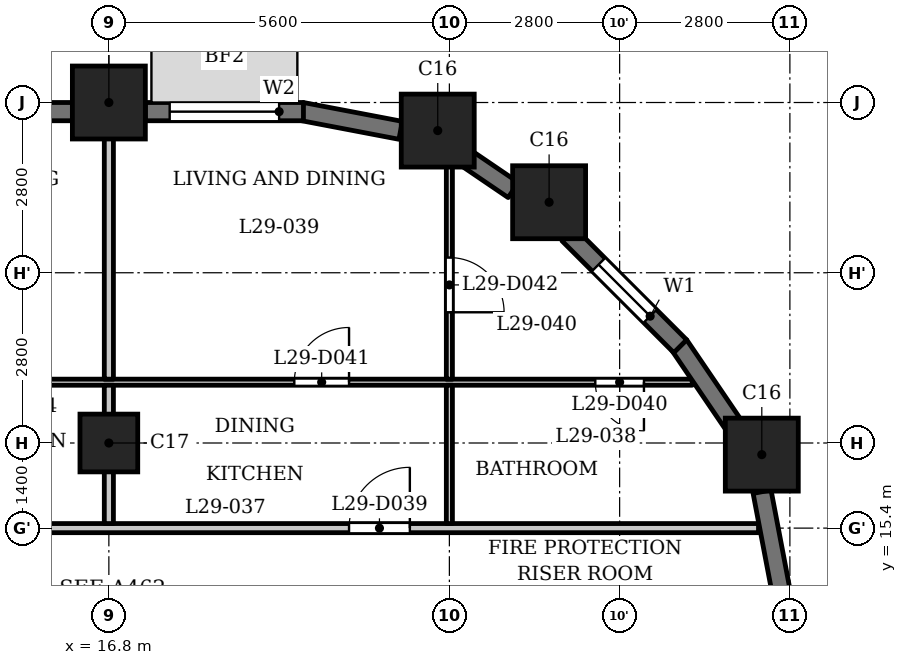
"""IFC4 building model, lengths in metres.
Left out: names, types, materials, properties, quantities, classifications, styles, units other than length and angle.
Written with IfcOpenShell. Run it as: python <this file> out.ifc"""

import sys

from ifc_helpers import new_model, si_unit, direction, frame, frame_2d, origin, origin_2d, place, context, subcontext, project, spatial, rectangle, extrude, element, fill, save


model = new_model("IFC4")
c1 = context("Model", 3, precision=1e-05, world=origin(), true_north=direction((0.0, 1.0)))
c2 = subcontext(c1, "Body", "Model", "MODEL_VIEW")
j1 = project(units=[si_unit("LENGTHUNIT", "METRE"), si_unit("PLANEANGLEUNIT", "RADIAN")], contexts=[c1])
p1 = place(None, origin())
s1 = spatial("IfcSite", under=j1, at=p1, CompositionType="ELEMENT")
p2 = place(p1, origin())
s2 = spatial("IfcBuilding", under=s1, at=p2, CompositionType="ELEMENT")
p3 = place(p2, frame((0.0, 0.0, 114.8)))
s3 = spatial("IfcBuildingStorey", under=s2, at=p3, CompositionType="ELEMENT", Elevation=114.8)
for number, where, z_axis, x_axis in (
    (1, (27.538, 16.609, 0.0), (0.0, 0.0, 1.0), (1.0, 0.0, 0.0)),
    (2, (24.04, 20.76, 0.0), (0.0, 0.0, 1.0), (1.0, 0.0, 0.0)),
    (3, (22.209, 21.938, 0.0), (0.0, 0.0, 1.0), (1.0, 0.0, 0.0)),
    (4, (16.8, 22.4, 0.0), (0.0, 0.0, 1.0), (1.0, 0.0, 0.0)),
):
    element("IfcColumn", number, at=place(p3, frame(where, z_axis=z_axis, x_axis=x_axis)), inside=s3, PredefinedType="COLUMN", context=c2, shape_type="SweptSolid", body=[
        extrude(rectangle(XDim=1.2, YDim=1.2, at=origin_2d()), origin(), (0.0, 0.0, 1.0), 3.5),
    ])
p4 = place(p3, frame((16.8, 16.8, 0.0), z_axis=(0.0, 0.0, 1.0), x_axis=(1.0, 0.0, 0.0)))
e5 = element("IfcColumn", 5, at=p4, inside=s3, PredefinedType="COLUMN", context=c2, shape_type="SweptSolid", body=[
    extrude(rectangle(XDim=0.95, YDim=0.95, at=origin_2d()), origin(), (0.0, 0.0, 1.0), 3.5),
])
for number, where, z_axis, x_axis in (
    (6, (27.853, 14.372, 0.0), (0.0, 0.0, 1.0), (-0.187, 0.982, 0.0)),
    (7, (27.11, 17.043, 0.0), (0.0, 0.0, 1.0), (-0.562, 0.827, 0.0)),
):
    element("IfcWall", number, at=place(p3, frame(where, z_axis=z_axis, x_axis=x_axis)), inside=s3, PredefinedType="SOLIDWALL", context=c2, shape_type="SweptSolid", body=[
        extrude(rectangle(XDim=1.656, YDim=0.3, at=frame_2d((0.828, 0.0))), origin(), (0.0, 0.0, 1.0), 2.4),
    ])
p5 = place(p3, frame((26.197, 18.391, 0.0), z_axis=(0.0, 0.0, 1.0), x_axis=(-0.707059830104, 0.707153729152, 0.0)))
e8 = element("IfcWall", 8, at=p5, inside=s3, PredefinedType="SOLIDWALL", context=c2, shape_type="SweptSolid", body=[
    extrude(rectangle(XDim=2.6, YDim=0.3, at=frame_2d((1.3, 0.0))), origin(), (0.0, 0.0, 1.0), 2.4),
])
p6 = place(p5, frame((0.7, 0.0, 0.6)))
e9 = element("IfcOpeningElement", 9, at=p6, cuts=e8, PredefinedType="OPENING", context=c2, shape_type="SweptSolid", body=[
    extrude(rectangle(XDim=1.2, YDim=1.55, at=frame_2d((0.6, 0.775))), frame((0.0, 0.16, 0.0), z_axis=(0.0, -1.0, 0.0), x_axis=(1.0, 0.0, 0.0)), (0.0, 0.0, 1.0), 0.32),
])
p7 = place(p3, frame((23.451, 20.96, 0.0), z_axis=(0.0, 0.0, 1.0), x_axis=(-0.827019434577, 0.562173331661, 0.0)))
e10 = element("IfcWall", 10, at=p7, inside=s3, PredefinedType="SOLIDWALL", context=c2, shape_type="SweptSolid", body=[
    extrude(rectangle(XDim=0.977, YDim=0.3, at=frame_2d((0.489, 0.0))), origin(), (0.0, 0.0, 1.0), 3.2),
])
p8 = place(p3, frame((21.599, 21.942, 0.0), z_axis=(0.0, 0.0, 1.0), x_axis=(-0.98228820662, 0.187376303559, 0.0)))
e11 = element("IfcWall", 11, at=p8, inside=s3, PredefinedType="SOLIDWALL", context=c2, shape_type="SweptSolid", body=[
    extrude(rectangle(XDim=1.656, YDim=0.3, at=frame_2d((0.828, 0.0))), origin(), (0.0, 0.0, 1.0), 2.4),
])
p9 = place(p3, frame((20.0, 22.25, 0.0), z_axis=(0.0, 0.0, 1.0), x_axis=(-1.0, 0.0, 0.0)))
e12 = element("IfcWall", 12, at=p9, inside=s3, PredefinedType="SOLIDWALL", context=c2, shape_type="SweptSolid", body=[
    extrude(rectangle(XDim=2.6, YDim=0.3, at=frame_2d((1.3, 0.0))), origin(), (0.0, 0.0, 1.0), 2.4),
])
p10 = place(p9, frame((0.4, 0.0, 0.9)))
e13 = element("IfcOpeningElement", 13, at=p10, cuts=e12, PredefinedType="OPENING", context=c2, shape_type="SweptSolid", body=[
    extrude(rectangle(XDim=1.8, YDim=1.25, at=frame_2d((0.9, 0.625))), frame((0.0, 0.16, 0.0), z_axis=(0.0, -1.0, 0.0), x_axis=(1.0, 0.0, 0.0)), (0.0, 0.0, 1.0), 0.32),
])
p11 = place(p3, frame((16.2, 22.25, 0.0), z_axis=(0.0, 0.0, 1.0), x_axis=(-1.0, 0.0, 0.0)))
e14 = element("IfcWall", 14, at=p11, inside=s3, PredefinedType="SOLIDWALL", context=c2, shape_type="SweptSolid", body=[
    extrude(rectangle(XDim=4.4, YDim=0.3, at=frame_2d((2.2, 0.0))), origin(), (0.0, 0.0, 1.0), 2.4),
])
p12 = place(p11, frame((0.4, 0.0, 1.2)))
e15 = element("IfcOpeningElement", 15, at=p12, cuts=e14, PredefinedType="OPENING", context=c2, shape_type="SweptSolid", body=[
    extrude(rectangle(XDim=3.6, YDim=0.95, at=frame_2d((1.8, 0.475))), frame((0.0, 0.16, 0.0), z_axis=(0.0, -1.0, 0.0), x_axis=(1.0, 0.0, 0.0)), (0.0, 0.0, 1.0), 0.32),
])
p13 = place(p3, frame((-27.484, 15.4, 0.0), z_axis=(0.0, 0.0, 1.0), x_axis=(1.0, 0.0, 0.0)))
e16 = element("IfcWall", 16, at=p13, inside=s3, PredefinedType="PARTITIONING", context=c2, shape_type="SweptSolid", body=[
    extrude(rectangle(XDim=54.968, YDim=0.15, at=frame_2d((27.484, 0.0))), origin(), (0.0, 0.0, 1.0), 3.2),
])
p14 = place(p13, frame((9.034, 0.0, 0.0)))
e17 = element("IfcOpeningElement", 17, at=p14, cuts=e16, PredefinedType="OPENING", context=c2, shape_type="SweptSolid", body=[
    extrude(rectangle(XDim=1.0, YDim=2.1, at=frame_2d((0.5, 1.05))), frame((0.0, 0.085, 0.0), z_axis=(0.0, -1.0, 0.0), x_axis=(1.0, 0.0, 0.0)), (0.0, 0.0, 1.0), 0.17),
])
p15 = place(p13, frame((14.634, 0.0, 0.0)))
e18 = element("IfcOpeningElement", 18, at=p15, cuts=e16, PredefinedType="OPENING", context=c2, shape_type="SweptSolid", body=[
    extrude(rectangle(XDim=1.0, YDim=2.1, at=frame_2d((0.5, 1.05))), frame((0.0, 0.085, 0.0), z_axis=(0.0, -1.0, 0.0), x_axis=(1.0, 0.0, 0.0)), (0.0, 0.0, 1.0), 0.17),
])
p16 = place(p13, frame((16.984, 0.0, 0.0)))
e19 = element("IfcOpeningElement", 19, at=p16, cuts=e16, PredefinedType="OPENING", context=c2, shape_type="SweptSolid", body=[
    extrude(rectangle(XDim=1.0, YDim=2.1, at=frame_2d((0.5, 1.05))), frame((0.0, 0.085, 0.0), z_axis=(0.0, -1.0, 0.0), x_axis=(1.0, 0.0, 0.0)), (0.0, 0.0, 1.0), 0.17),
])
p17 = place(p13, frame((28.084, 0.0, 0.0)))
e20 = element("IfcOpeningElement", 20, at=p17, cuts=e16, PredefinedType="OPENING", context=c2, shape_type="SweptSolid", body=[
    extrude(rectangle(XDim=1.0, YDim=2.1, at=frame_2d((0.5, 1.05))), frame((0.0, 0.085, 0.0), z_axis=(0.0, -1.0, 0.0), x_axis=(1.0, 0.0, 0.0)), (0.0, 0.0, 1.0), 0.17),
])
p18 = place(p13, frame((34.834, 0.0, 0.0)))
e21 = element("IfcOpeningElement", 21, at=p18, cuts=e16, PredefinedType="OPENING", context=c2, shape_type="SweptSolid", body=[
    extrude(rectangle(XDim=1.0, YDim=2.1, at=frame_2d((0.5, 1.05))), frame((0.0, 0.085, 0.0), z_axis=(0.0, -1.0, 0.0), x_axis=(1.0, 0.0, 0.0)), (0.0, 0.0, 1.0), 0.17),
])
p19 = place(p13, frame((41.884, 0.0, 0.0)))
e22 = element("IfcOpeningElement", 22, at=p19, cuts=e16, PredefinedType="OPENING", context=c2, shape_type="SweptSolid", body=[
    extrude(rectangle(XDim=1.0, YDim=2.1, at=frame_2d((0.5, 1.05))), frame((0.0, 0.085, 0.0), z_axis=(0.0, -1.0, 0.0), x_axis=(1.0, 0.0, 0.0)), (0.0, 0.0, 1.0), 0.17),
])
p20 = place(p13, frame((48.234, 0.0, 0.0)))
e23 = element("IfcOpeningElement", 23, at=p20, cuts=e16, PredefinedType="OPENING", context=c2, shape_type="SweptSolid", body=[
    extrude(rectangle(XDim=1.0, YDim=2.1, at=frame_2d((0.5, 1.05))), frame((0.0, 0.085, 0.0), z_axis=(0.0, -1.0, 0.0), x_axis=(1.0, 0.0, 0.0)), (0.0, 0.0, 1.0), 0.17),
])
p21 = place(p3, frame((-26.465, 17.8, 0.0), z_axis=(0.0, 0.0, 1.0), x_axis=(1.0, 0.0, 0.0)))
e24 = element("IfcWall", 24, at=p21, inside=s3, PredefinedType="PARTITIONING", context=c2, shape_type="SweptSolid", body=[
    extrude(rectangle(XDim=52.859, YDim=0.1, at=frame_2d((26.43, 0.0))), origin(), (0.0, 0.0, 1.0), 3.2),
])
p22 = place(p21, frame((2.697, 0.0, 0.0)))
e25 = element("IfcOpeningElement", 25, at=p22, cuts=e24, PredefinedType="OPENING", context=c2, shape_type="SweptSolid", body=[
    extrude(rectangle(XDim=0.8, YDim=2.1, at=frame_2d((0.4, 1.05))), frame((0.0, 0.06, 0.0), z_axis=(0.0, -1.0, 0.0), x_axis=(1.0, 0.0, 0.0)), (0.0, 0.0, 1.0), 0.12),
])
p23 = place(p21, frame((7.115, 0.0, 0.0)))
e26 = element("IfcOpeningElement", 26, at=p23, cuts=e24, PredefinedType="OPENING", context=c2, shape_type="SweptSolid", body=[
    extrude(rectangle(XDim=0.9, YDim=2.1, at=frame_2d((0.45, 1.05))), frame((0.0, 0.06, 0.0), z_axis=(0.0, -1.0, 0.0), x_axis=(1.0, 0.0, 0.0)), (0.0, 0.0, 1.0), 0.12),
])
p24 = place(p21, frame((10.315, 0.0, 0.0)))
e27 = element("IfcOpeningElement", 27, at=p24, cuts=e24, PredefinedType="OPENING", context=c2, shape_type="SweptSolid", body=[
    extrude(rectangle(XDim=0.8, YDim=2.1, at=frame_2d((0.4, 1.05))), frame((0.0, 0.06, 0.0), z_axis=(0.0, -1.0, 0.0), x_axis=(1.0, 0.0, 0.0)), (0.0, 0.0, 1.0), 0.12),
])
p25 = place(p21, frame((12.715, 0.0, 0.0)))
e28 = element("IfcOpeningElement", 28, at=p25, cuts=e24, PredefinedType="OPENING", context=c2, shape_type="SweptSolid", body=[
    extrude(rectangle(XDim=0.9, YDim=2.1, at=frame_2d((0.45, 1.05))), frame((0.0, 0.06, 0.0), z_axis=(0.0, -1.0, 0.0), x_axis=(1.0, 0.0, 0.0)), (0.0, 0.0, 1.0), 0.12),
])
p26 = place(p21, frame((21.515, 0.0, 0.0)))
e29 = element("IfcOpeningElement", 29, at=p26, cuts=e24, PredefinedType="OPENING", context=c2, shape_type="SweptSolid", body=[
    extrude(rectangle(XDim=0.8, YDim=2.1, at=frame_2d((0.4, 1.05))), frame((0.0, 0.06, 0.0), z_axis=(0.0, -1.0, 0.0), x_axis=(1.0, 0.0, 0.0)), (0.0, 0.0, 1.0), 0.12),
])
p27 = place(p21, frame((17.065, 0.0, 0.0)))
e30 = element("IfcOpeningElement", 30, at=p27, cuts=e24, PredefinedType="OPENING", context=c2, shape_type="SweptSolid", body=[
    extrude(rectangle(XDim=0.9, YDim=2.1, at=frame_2d((0.45, 1.05))), frame((0.0, 0.06, 0.0), z_axis=(0.0, -1.0, 0.0), x_axis=(1.0, 0.0, 0.0)), (0.0, 0.0, 1.0), 0.12),
])
p28 = place(p21, frame((30.365, 0.0, 0.0)))
e31 = element("IfcOpeningElement", 31, at=p28, cuts=e24, PredefinedType="OPENING", context=c2, shape_type="SweptSolid", body=[
    extrude(rectangle(XDim=0.8, YDim=2.1, at=frame_2d((0.4, 1.05))), frame((0.0, 0.06, 0.0), z_axis=(0.0, -1.0, 0.0), x_axis=(1.0, 0.0, 0.0)), (0.0, 0.0, 1.0), 0.12),
])
p29 = place(p21, frame((28.165, 0.0, 0.0)))
e32 = element("IfcOpeningElement", 32, at=p29, cuts=e24, PredefinedType="OPENING", context=c2, shape_type="SweptSolid", body=[
    extrude(rectangle(XDim=0.9, YDim=2.1, at=frame_2d((0.45, 1.05))), frame((0.0, 0.06, 0.0), z_axis=(0.0, -1.0, 0.0), x_axis=(1.0, 0.0, 0.0)), (0.0, 0.0, 1.0), 0.12),
])
p30 = place(p21, frame((36.115, 0.0, 0.0)))
e33 = element("IfcOpeningElement", 33, at=p30, cuts=e24, PredefinedType="OPENING", context=c2, shape_type="SweptSolid", body=[
    extrude(rectangle(XDim=0.8, YDim=2.1, at=frame_2d((0.4, 1.05))), frame((0.0, 0.06, 0.0), z_axis=(0.0, -1.0, 0.0), x_axis=(1.0, 0.0, 0.0)), (0.0, 0.0, 1.0), 0.12),
])
p31 = place(p21, frame((32.915, 0.0, 0.0)))
e34 = element("IfcOpeningElement", 34, at=p31, cuts=e24, PredefinedType="OPENING", context=c2, shape_type="SweptSolid", body=[
    extrude(rectangle(XDim=0.9, YDim=2.1, at=frame_2d((0.45, 1.05))), frame((0.0, 0.06, 0.0), z_axis=(0.0, -1.0, 0.0), x_axis=(1.0, 0.0, 0.0)), (0.0, 0.0, 1.0), 0.12),
])
p32 = place(p21, frame((38.315, 0.0, 0.0)))
e35 = element("IfcOpeningElement", 35, at=p32, cuts=e24, PredefinedType="OPENING", context=c2, shape_type="SweptSolid", body=[
    extrude(rectangle(XDim=0.8, YDim=2.1, at=frame_2d((0.4, 1.05))), frame((0.0, 0.06, 0.0), z_axis=(0.0, -1.0, 0.0), x_axis=(1.0, 0.0, 0.0)), (0.0, 0.0, 1.0), 0.12),
])
p33 = place(p21, frame((40.965, 0.0, 0.0)))
e36 = element("IfcOpeningElement", 36, at=p33, cuts=e24, PredefinedType="OPENING", context=c2, shape_type="SweptSolid", body=[
    extrude(rectangle(XDim=0.9, YDim=2.1, at=frame_2d((0.45, 1.05))), frame((0.0, 0.06, 0.0), z_axis=(0.0, -1.0, 0.0), x_axis=(1.0, 0.0, 0.0)), (0.0, 0.0, 1.0), 0.12),
])
p34 = place(p21, frame((51.265, 0.0, 0.0)))
e37 = element("IfcOpeningElement", 37, at=p34, cuts=e24, PredefinedType="OPENING", context=c2, shape_type="SweptSolid", body=[
    extrude(rectangle(XDim=0.8, YDim=2.1, at=frame_2d((0.4, 1.05))), frame((0.0, 0.06, 0.0), z_axis=(0.0, -1.0, 0.0), x_axis=(1.0, 0.0, 0.0)), (0.0, 0.0, 1.0), 0.12),
])
p35 = place(p21, frame((46.315, 0.0, 0.0)))
e38 = element("IfcOpeningElement", 38, at=p35, cuts=e24, PredefinedType="OPENING", context=c2, shape_type="SweptSolid", body=[
    extrude(rectangle(XDim=0.9, YDim=2.1, at=frame_2d((0.45, 1.05))), frame((0.0, 0.06, 0.0), z_axis=(0.0, -1.0, 0.0), x_axis=(1.0, 0.0, 0.0)), (0.0, 0.0, 1.0), 0.12),
])
p36 = place(p3, frame((16.8, 15.475, 0.0), z_axis=(0.0, 0.0, 1.0), x_axis=(0.0, 1.0, 0.0)))
e39 = element("IfcWall", 39, at=p36, inside=s3, PredefinedType="PARTITIONING", context=c2, shape_type="SweptSolid", body=[
    extrude(rectangle(XDim=2.275, YDim=0.15, at=frame_2d((1.137, 0.0))), origin(), (0.0, 0.0, 1.0), 3.2),
])
p37 = place(p3, frame((16.8, 17.85, 0.0), z_axis=(0.0, 0.0, 1.0), x_axis=(0.0, 1.0, 0.0)))
e40 = element("IfcWall", 40, at=p37, inside=s3, PredefinedType="PARTITIONING", context=c2, shape_type="SweptSolid", body=[
    extrude(rectangle(XDim=5.13, YDim=0.15, at=frame_2d((2.565, 0.0))), origin(), (0.0, 0.0, 1.0), 3.2),
])
p38 = place(p3, frame((22.4, 15.475, 0.0), z_axis=(0.0, 0.0, 1.0), x_axis=(0.0, 1.0, 0.0)))
e41 = element("IfcWall", 41, at=p38, inside=s3, PredefinedType="PARTITIONING", context=c2, shape_type="SweptSolid", body=[
    extrude(rectangle(XDim=2.275, YDim=0.1, at=frame_2d((1.137, 0.0))), origin(), (0.0, 0.0, 1.0), 3.2),
])
p39 = place(p3, frame((22.4, 17.85, 0.0), z_axis=(0.0, 0.0, 1.0), x_axis=(0.0, 1.0, 0.0)))
e42 = element("IfcWall", 42, at=p39, inside=s3, PredefinedType="PARTITIONING", context=c2, shape_type="SweptSolid", body=[
    extrude(rectangle(XDim=3.87, YDim=0.1, at=frame_2d((1.935, 0.0))), origin(), (0.0, 0.0, 1.0), 3.2),
])
p40 = place(p39, frame((1.1, 0.0, 0.0)))
e43 = element("IfcOpeningElement", 43, at=p40, cuts=e42, PredefinedType="OPENING", context=c2, shape_type="SweptSolid", body=[
    extrude(rectangle(XDim=0.9, YDim=2.1, at=frame_2d((0.45, 1.05))), frame((0.0, 0.06, 0.0), z_axis=(0.0, -1.0, 0.0), x_axis=(1.0, 0.0, 0.0)), (0.0, 0.0, 1.0), 0.12),
])
p41 = place(p20, origin())
e44 = element("IfcDoor", 44, at=p41, inside=s3, OperationType="SINGLE_SWING_LEFT", PredefinedType="DOOR", context=c2, shape_type="SweptSolid", body=[
    extrude(rectangle(XDim=1.0, YDim=2.1, at=frame_2d((0.5, 1.05))), frame((0.0, 0.025, 0.0), z_axis=(0.0, -1.0, 0.0), x_axis=(1.0, 0.0, 0.0)), (0.0, 0.0, 1.0), 0.05),
])
fill(e23, e44)
p42 = place(p34, origin())
e45 = element("IfcDoor", 45, at=p42, inside=s3, OperationType="SINGLE_SWING_RIGHT", PredefinedType="DOOR", context=c2, shape_type="SweptSolid", body=[
    extrude(rectangle(XDim=0.8, YDim=2.1, at=frame_2d((0.4, 1.05))), frame((0.0, 0.025, 0.0), z_axis=(0.0, -1.0, 0.0), x_axis=(1.0, 0.0, 0.0)), (0.0, 0.0, 1.0), 0.05),
])
fill(e37, e45)
p43 = place(p35, origin())
e46 = element("IfcDoor", 46, at=p43, inside=s3, OperationType="SINGLE_SWING_LEFT", PredefinedType="DOOR", context=c2, shape_type="SweptSolid", body=[
    extrude(rectangle(XDim=0.9, YDim=2.1, at=frame_2d((0.45, 1.05))), frame((0.0, 0.025, 0.0), z_axis=(0.0, -1.0, 0.0), x_axis=(1.0, 0.0, 0.0)), (0.0, 0.0, 1.0), 0.05),
])
fill(e38, e46)
p44 = place(p40, origin())
e47 = element("IfcDoor", 47, at=p44, inside=s3, OperationType="SINGLE_SWING_LEFT", PredefinedType="DOOR", context=c2, shape_type="SweptSolid", body=[
    extrude(rectangle(XDim=0.9, YDim=2.1, at=frame_2d((0.45, 1.05))), frame((0.0, 0.025, 0.0), z_axis=(0.0, -1.0, 0.0), x_axis=(1.0, 0.0, 0.0)), (0.0, 0.0, 1.0), 0.05),
])
fill(e43, e47)
p45 = place(p6, origin())
e48 = element("IfcWindow", 48, at=p45, inside=s3, PartitioningType="SINGLE_PANEL", PredefinedType="WINDOW", context=c2, shape_type="SweptSolid", body=[
    extrude(rectangle(XDim=1.2, YDim=1.55, at=frame_2d((0.6, 0.775))), frame((0.0, 0.03, 0.0), z_axis=(0.0, -1.0, 0.0), x_axis=(1.0, 0.0, 0.0)), (0.0, 0.0, 1.0), 0.06),
])
fill(e9, e48)
p46 = place(p10, origin())
e49 = element("IfcWindow", 49, at=p46, inside=s3, PartitioningType="SINGLE_PANEL", PredefinedType="WINDOW", context=c2, shape_type="SweptSolid", body=[
    extrude(rectangle(XDim=1.8, YDim=1.25, at=frame_2d((0.9, 0.625))), frame((0.0, 0.03, 0.0), z_axis=(0.0, -1.0, 0.0), x_axis=(1.0, 0.0, 0.0)), (0.0, 0.0, 1.0), 0.06),
])
fill(e13, e49)
save(model, sys.argv[1])
